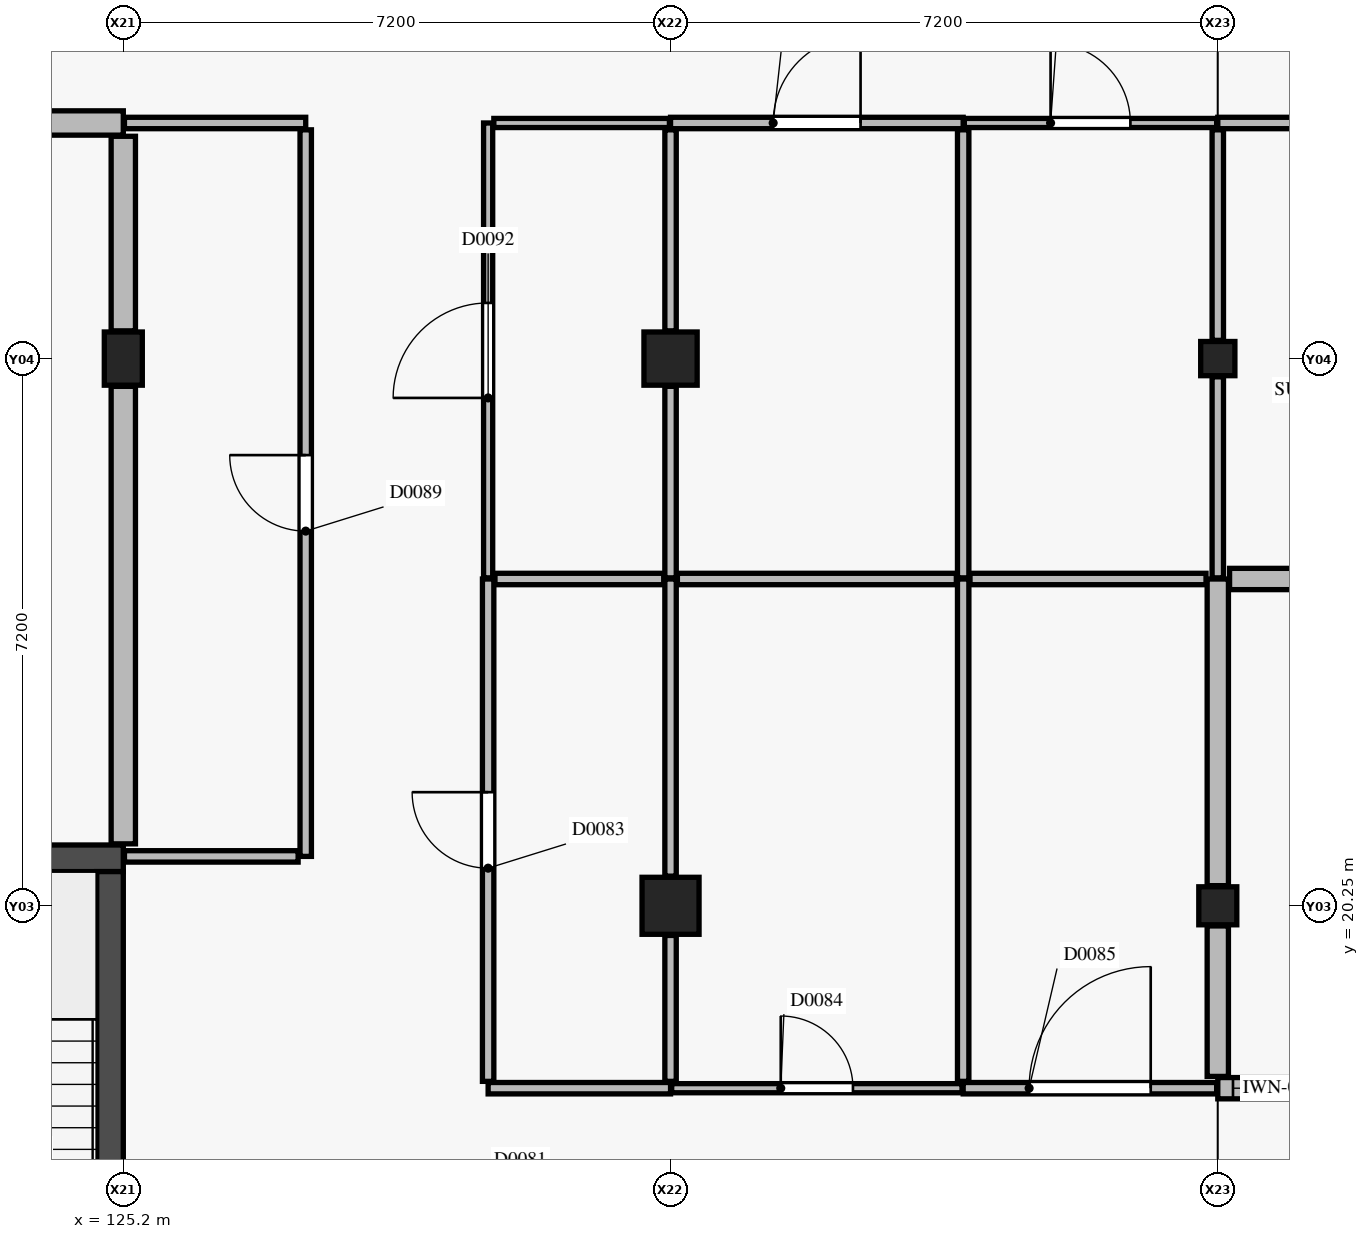
"""IFC4 building model, lengths in metres.
Left out: names, types, materials, properties, quantities, classifications, styles, units other than length and angle.
Written with IfcOpenShell. Run it as: python <this file> out.ifc"""

import sys

from ifc_helpers import new_model, si_unit, direction, frame, frame_2d, origin, origin_2d, place, context, subcontext, project, spatial, rectangle, extrude, element, fill, save


model = new_model("IFC4")
c1 = context("Model", 3, precision=1e-05, world=origin(), true_north=direction((0.0, 1.0)))
c2 = subcontext(c1, "Body", "Model", "MODEL_VIEW")
j1 = project(units=[si_unit("LENGTHUNIT", "METRE"), si_unit("PLANEANGLEUNIT", "RADIAN")], contexts=[c1])
p1 = place(None, origin())
s1 = spatial("IfcSite", under=j1, at=p1, CompositionType="ELEMENT")
p2 = place(p1, origin())
s2 = spatial("IfcBuilding", under=s1, at=p2, CompositionType="ELEMENT")
p3 = place(p2, origin())
s3 = spatial("IfcBuildingStorey", under=s2, at=p3, CompositionType="ELEMENT", Elevation=0.0)
p4 = place(p3, frame((125.2, 27.45, 0.0), z_axis=(0.0, 0.0, 1.0), x_axis=(1.0, 0.0, 0.0)))
e1 = element("IfcColumn", 1, at=p4, inside=s3, PredefinedType="COLUMN", context=c2, shape_type="SweptSolid", body=[
    extrude(rectangle(XDim=0.5, YDim=0.7, at=origin_2d()), origin(), (0.0, 0.0, 1.0), 4.8),
])
p5 = place(p3, frame((132.4, 20.25, 0.0), z_axis=(0.0, 0.0, 1.0), x_axis=(1.0, 0.0, 0.0)))
e2 = element("IfcColumn", 2, at=p5, inside=s3, PredefinedType="COLUMN", context=c2, shape_type="SweptSolid", body=[
    extrude(rectangle(XDim=0.75, YDim=0.75, at=origin_2d()), origin(), (0.0, 0.0, 1.0), 4.8),
])
p6 = place(p3, frame((132.4, 27.45, 0.0), z_axis=(0.0, 0.0, 1.0), x_axis=(1.0, 0.0, 0.0)))
e3 = element("IfcColumn", 3, at=p6, inside=s3, PredefinedType="COLUMN", context=c2, shape_type="SweptSolid", body=[
    extrude(rectangle(XDim=0.7, YDim=0.7, at=origin_2d()), origin(), (0.0, 0.0, 1.0), 4.8),
])
p7 = place(p3, frame((139.6, 20.25, 0.0), z_axis=(0.0, 0.0, 1.0), x_axis=(1.0, 0.0, 0.0)))
e4 = element("IfcColumn", 4, at=p7, inside=s3, PredefinedType="COLUMN", context=c2, shape_type="SweptSolid", body=[
    extrude(rectangle(XDim=0.5, YDim=0.5, at=origin_2d()), origin(), (0.0, 0.0, 1.0), 4.8),
])
p8 = place(p3, frame((139.6, 27.45, 0.0), z_axis=(0.0, 0.0, 1.0), x_axis=(1.0, 0.0, 0.0)))
e5 = element("IfcColumn", 5, at=p8, inside=s3, PredefinedType="COLUMN", context=c2, shape_type="SweptSolid", body=[
    extrude(rectangle(XDim=0.45, YDim=0.45, at=origin_2d()), origin(), (0.0, 0.0, 1.0), 4.8),
])
p9 = place(p3, frame((121.2, 20.875, 0.0), z_axis=(0.0, 0.0, 1.0), x_axis=(1.0, 0.0, 0.0)))
e6 = element("IfcWall", 6, at=p9, inside=s3, PredefinedType="SHEAR", context=c2, shape_type="SweptSolid", body=[
    extrude(rectangle(XDim=4.0, YDim=0.35, at=frame_2d((2.0, 0.0))), origin(), (0.0, 0.0, 1.0), 4.46),
])
p10 = place(p3, frame((125.025, 13.4, 0.0), z_axis=(0.0, 0.0, 1.0), x_axis=(0.0, 1.0, 0.0)))
e7 = element("IfcWall", 7, at=p10, inside=s3, PredefinedType="SHEAR", context=c2, shape_type="SweptSolid", body=[
    extrude(rectangle(XDim=7.3, YDim=0.35, at=frame_2d((3.65, 0.0))), origin(), (0.0, 0.0, 1.0), 4.46),
])
p11 = place(p10, frame((0.12, 0.0, 0.0)))
e8 = element("IfcOpeningElement", 8, at=p11, cuts=e7, PredefinedType="OPENING", context=c2, shape_type="SweptSolid", body=[
    extrude(rectangle(XDim=1.5, YDim=2.15, at=frame_2d((0.75, 1.075))), frame((0.0, 0.185, 0.0), z_axis=(0.0, -1.0, 0.0), x_axis=(1.0, 0.0, 0.0)), (0.0, 0.0, 1.0), 0.37),
])
p12 = place(p3, frame((121.775, 30.55, 0.0), z_axis=(0.0, 0.0, 1.0), x_axis=(1.0, 0.0, 0.0)))
e9 = element("IfcWall", 9, at=p12, inside=s3, PredefinedType="PARTITIONING", context=c2, shape_type="SweptSolid", body=[
    extrude(rectangle(XDim=3.425, YDim=0.32, at=frame_2d((1.712, 0.0))), origin(), (0.0, 0.0, 1.0), 3.925),
])
p13 = place(p3, frame((139.6, 17.85, 0.0), z_axis=(0.0, 0.0, 1.0), x_axis=(1.0, 0.0, 0.0)))
e10 = element("IfcWall", 10, at=p13, inside=s3, PredefinedType="PARTITIONING", context=c2, shape_type="SweptSolid", body=[
    extrude(rectangle(XDim=7.2, YDim=0.28, at=frame_2d((3.6, 0.0))), origin(), (0.0, 0.0, 1.0), 3.725),
])
p14 = place(p13, frame((2.925, 0.0, 0.0)))
e11 = element("IfcOpeningElement", 11, at=p14, cuts=e10, PredefinedType="OPENING", context=c2, shape_type="SweptSolid", body=[
    extrude(rectangle(XDim=1.35, YDim=2.2, at=frame_2d((0.675, 1.1))), frame((0.0, 0.15, 0.0), z_axis=(0.0, -1.0, 0.0), x_axis=(1.0, 0.0, 0.0)), (0.0, 0.0, 1.0), 0.3),
])
p15 = place(p13, frame((0.2, 0.0, 1.05)))
e12 = element("IfcOpeningElement", 12, at=p15, cuts=e10, PredefinedType="OPENING", context=c2, shape_type="SweptSolid", body=[
    extrude(rectangle(XDim=1.1, YDim=1.1, at=frame_2d((0.55, 0.55))), frame((0.0, 0.15, 0.0), z_axis=(0.0, -1.0, 0.0), x_axis=(1.0, 0.0, 0.0)), (0.0, 0.0, 1.0), 0.3),
])
p16 = place(p3, frame((130.0, 17.85, 0.0), z_axis=(0.0, 0.0, 1.0), x_axis=(1.0, 0.0, 0.0)))
e13 = element("IfcWall", 13, at=p16, inside=s3, PredefinedType="PARTITIONING", context=c2, shape_type="SweptSolid", body=[
    extrude(rectangle(XDim=2.4, YDim=0.15, at=frame_2d((1.2, 0.0))), origin(), (0.0, 0.0, 1.0), 3.925),
])
p17 = place(p3, frame((130.0, 17.94, 0.0), z_axis=(0.0, 0.0, 1.0), x_axis=(0.0, 1.0, 0.0)))
e14 = element("IfcWall", 14, at=p17, inside=s3, PredefinedType="PARTITIONING", context=c2, shape_type="SweptSolid", body=[
    extrude(rectangle(XDim=6.61, YDim=0.15, at=frame_2d((3.305, 0.0))), origin(), (0.0, 0.0, 1.0), 3.645),
])
p18 = place(p17, frame((2.805, 0.0, 0.0)))
e15 = element("IfcOpeningElement", 15, at=p18, cuts=e14, PredefinedType="OPENING", context=c2, shape_type="SweptSolid", body=[
    extrude(rectangle(XDim=1.0, YDim=2.15, at=frame_2d((0.5, 1.075))), frame((0.0, 0.085, 0.0), z_axis=(0.0, -1.0, 0.0), x_axis=(1.0, 0.0, 0.0)), (0.0, 0.0, 1.0), 0.17),
])
p19 = place(p3, frame((136.25, 17.85, 0.0), z_axis=(0.0, 0.0, 1.0), x_axis=(1.0, 0.0, 0.0)))
e16 = element("IfcWall", 16, at=p19, inside=s3, PredefinedType="PARTITIONING", context=c2, shape_type="SweptSolid", body=[
    extrude(rectangle(XDim=3.335, YDim=0.15, at=frame_2d((1.667, 0.0))), origin(), (0.0, 0.0, 1.0), 3.725),
])
p20 = place(p19, frame((0.867, 0.0, 0.0)))
e17 = element("IfcOpeningElement", 17, at=p20, cuts=e16, PredefinedType="OPENING", context=c2, shape_type="SweptSolid", body=[
    extrude(rectangle(XDim=1.6, YDim=2.25, at=frame_2d((0.8, 1.125))), frame((0.0, 0.085, 0.0), z_axis=(0.0, -1.0, 0.0), x_axis=(1.0, 0.0, 0.0)), (0.0, 0.0, 1.0), 0.17),
])
p21 = place(p3, frame((125.215, 20.9, 0.0), z_axis=(0.0, 0.0, 1.0), x_axis=(1.0, 0.0, 0.0)))
e18 = element("IfcWall", 18, at=p21, inside=s3, PredefinedType="PARTITIONING", context=c2, shape_type="SweptSolid", body=[
    extrude(rectangle(XDim=2.285, YDim=0.15, at=frame_2d((1.143, 0.0))), origin(), (0.0, 0.0, 1.0), 4.46),
])
p22 = place(p3, frame((125.215, 30.55, 0.0), z_axis=(0.0, 0.0, 1.0), x_axis=(1.0, 0.0, 0.0)))
e19 = element("IfcWall", 19, at=p22, inside=s3, PredefinedType="PARTITIONING", context=c2, shape_type="SweptSolid", body=[
    extrude(rectangle(XDim=2.385, YDim=0.15, at=frame_2d((1.192, 0.0))), origin(), (0.0, 0.0, 1.0), 3.925),
])
p23 = place(p3, frame((127.6, 20.9, 0.0), z_axis=(0.0, 0.0, 1.0), x_axis=(0.0, 1.0, 0.0)))
e20 = element("IfcWall", 20, at=p23, inside=s3, PredefinedType="PARTITIONING", context=c2, shape_type="SweptSolid", body=[
    extrude(rectangle(XDim=9.56, YDim=0.15, at=frame_2d((4.78, 0.0))), origin(), (0.0, 0.0, 1.0), 3.795),
])
p24 = place(p23, frame((4.28, 0.0, 0.0)))
e21 = element("IfcOpeningElement", 21, at=p24, cuts=e20, PredefinedType="OPENING", context=c2, shape_type="SweptSolid", body=[
    extrude(rectangle(XDim=1.0, YDim=2.15, at=frame_2d((0.5, 1.075))), frame((0.0, 0.085, 0.0), z_axis=(0.0, -1.0, 0.0), x_axis=(1.0, 0.0, 0.0)), (0.0, 0.0, 1.0), 0.17),
])
p25 = place(p3, frame((132.4, 30.55, 0.0), z_axis=(0.0, 0.0, 1.0), x_axis=(1.0, 0.0, 0.0)))
e22 = element("IfcWall", 22, at=p25, inside=s3, PredefinedType="PARTITIONING", context=c2, shape_type="SweptSolid", body=[
    extrude(rectangle(XDim=3.85, YDim=0.15, at=frame_2d((1.925, 0.0))), origin(), (0.0, 0.0, 1.0), 3.725),
])
p26 = place(p25, frame((1.35, 0.0, 0.0)))
e23 = element("IfcOpeningElement", 23, at=p26, cuts=e22, PredefinedType="OPENING", context=c2, shape_type="SweptSolid", body=[
    extrude(rectangle(XDim=1.15, YDim=2.15, at=frame_2d((0.575, 1.075))), frame((0.0, 0.085, 0.0), z_axis=(0.0, -1.0, 0.0), x_axis=(1.0, 0.0, 0.0)), (0.0, 0.0, 1.0), 0.17),
])
p27 = place(p3, frame((139.6, 30.55, 0.0), z_axis=(0.0, 0.0, 1.0), x_axis=(1.0, 0.0, 0.0)))
e24 = element("IfcWall", 24, at=p27, inside=s3, PredefinedType="PARTITIONING", context=c2, shape_type="SweptSolid", body=[
    extrude(rectangle(XDim=7.2, YDim=0.15, at=frame_2d((3.6, 0.0))), origin(), (0.0, 0.0, 1.0), 3.795),
])
p28 = place(p27, frame((3.1, 0.0, 0.0)))
e25 = element("IfcOpeningElement", 25, at=p28, cuts=e24, PredefinedType="OPENING", context=c2, shape_type="SweptSolid", body=[
    extrude(rectangle(XDim=1.0, YDim=2.15, at=frame_2d((0.5, 1.075))), frame((0.0, 0.085, 0.0), z_axis=(0.0, -1.0, 0.0), x_axis=(1.0, 0.0, 0.0)), (0.0, 0.0, 1.0), 0.17),
])
p29 = place(p3, frame((132.415, 17.85, 0.0), z_axis=(0.0, 0.0, 1.0), x_axis=(1.0, 0.0, 0.0)))
e26 = element("IfcWall", 26, at=p29, inside=s3, PredefinedType="PARTITIONING", context=c2, shape_type="SweptSolid", body=[
    extrude(rectangle(XDim=3.82, YDim=0.12, at=frame_2d((1.91, 0.0))), origin(), (0.0, 0.0, 1.0), 3.925),
])
p30 = place(p29, frame((1.435, 0.0, 0.0)))
e27 = element("IfcOpeningElement", 27, at=p30, cuts=e26, PredefinedType="OPENING", context=c2, shape_type="SweptSolid", body=[
    extrude(rectangle(XDim=0.95, YDim=2.1, at=frame_2d((0.475, 1.05))), frame((0.0, 0.07, 0.0), z_axis=(0.0, -1.0, 0.0), x_axis=(1.0, 0.0, 0.0)), (0.0, 0.0, 1.0), 0.14),
])
p31 = place(p3, frame((130.0, 24.565, 0.0), z_axis=(0.0, 0.0, 1.0), x_axis=(0.0, 1.0, 0.0)))
e28 = element("IfcWall", 28, at=p31, inside=s3, PredefinedType="PARTITIONING", context=c2, shape_type="SweptSolid", body=[
    extrude(rectangle(XDim=5.985, YDim=0.12, at=frame_2d((2.993, 0.0))), origin(), (0.0, 0.0, 1.0), 3.795),
])
p32 = place(p31, frame((2.367, 0.0, 0.0)))
e29 = element("IfcOpeningElement", 29, at=p32, cuts=e28, PredefinedType="OPENING", context=c2, shape_type="SweptSolid", body=[
    extrude(rectangle(XDim=1.25, YDim=2.15, at=frame_2d((0.625, 1.075))), frame((0.0, 0.07, 0.0), z_axis=(0.0, -1.0, 0.0), x_axis=(1.0, 0.0, 0.0)), (0.0, 0.0, 1.0), 0.14),
])
p33 = place(p3, frame((130.075, 30.55, 0.0), z_axis=(0.0, 0.0, 1.0), x_axis=(1.0, 0.0, 0.0)))
e30 = element("IfcWall", 30, at=p33, inside=s3, PredefinedType="PARTITIONING", context=c2, shape_type="SweptSolid", body=[
    extrude(rectangle(XDim=2.31, YDim=0.12, at=frame_2d((1.155, 0.0))), origin(), (0.0, 0.0, 1.0), 3.725),
])
p34 = place(p3, frame((136.265, 30.55, 0.0), z_axis=(0.0, 0.0, 1.0), x_axis=(1.0, 0.0, 0.0)))
e31 = element("IfcWall", 31, at=p34, inside=s3, PredefinedType="PARTITIONING", context=c2, shape_type="SweptSolid", body=[
    extrude(rectangle(XDim=3.32, YDim=0.12, at=frame_2d((1.66, 0.0))), origin(), (0.0, 0.0, 1.0), 3.795),
])
p35 = place(p34, frame((1.135, 0.0, 0.0)))
e32 = element("IfcOpeningElement", 32, at=p35, cuts=e31, PredefinedType="OPENING", context=c2, shape_type="SweptSolid", body=[
    extrude(rectangle(XDim=1.05, YDim=2.15, at=frame_2d((0.525, 1.075))), frame((0.0, 0.07, 0.0), z_axis=(0.0, -1.0, 0.0), x_axis=(1.0, 0.0, 0.0)), (0.0, 0.0, 1.0), 0.14),
])
p36 = place(p3, frame((125.2, 21.065, 0.0), z_axis=(0.0, 0.0, 1.0), x_axis=(0.0, 1.0, 0.0)))
e33 = element("IfcWall", 33, at=p36, inside=s3, PredefinedType="PARTITIONING", context=c2, shape_type="SweptSolid", body=[
    extrude(rectangle(XDim=6.02, YDim=0.32, at=frame_2d((3.01, 0.0))), origin(), (0.0, 0.0, 1.0), 4.46),
])
p37 = place(p3, frame((125.2, 27.815, 0.0), z_axis=(0.0, 0.0, 1.0), x_axis=(0.0, 1.0, 0.0)))
e34 = element("IfcWall", 34, at=p37, inside=s3, PredefinedType="PARTITIONING", context=c2, shape_type="SweptSolid", body=[
    extrude(rectangle(XDim=2.56, YDim=0.32, at=frame_2d((1.28, 0.0))), origin(), (0.0, 0.0, 1.0), 3.925),
])
p38 = place(p3, frame((139.6, 18.005, 0.0), z_axis=(0.0, 0.0, 1.0), x_axis=(0.0, 1.0, 0.0)))
e35 = element("IfcWall", 35, at=p38, inside=s3, PredefinedType="PARTITIONING", context=c2, shape_type="SweptSolid", body=[
    extrude(rectangle(XDim=1.98, YDim=0.28, at=frame_2d((0.99, 0.0))), origin(), (0.0, 0.0, 1.0), 3.725),
])
p39 = place(p3, frame((139.6, 20.515, 0.0), z_axis=(0.0, 0.0, 1.0), x_axis=(0.0, 1.0, 0.0)))
e36 = element("IfcWall", 36, at=p39, inside=s3, PredefinedType="PARTITIONING", context=c2, shape_type="SweptSolid", body=[
    extrude(rectangle(XDim=4.035, YDim=0.28, at=frame_2d((2.018, 0.0))), origin(), (0.0, 0.0, 1.0), 3.795),
])
p40 = place(p3, frame((139.755, 24.55, 0.0), z_axis=(0.0, 0.0, 1.0), x_axis=(1.0, 0.0, 0.0)))
e37 = element("IfcWall", 37, at=p40, inside=s3, PredefinedType="PARTITIONING", context=c2, shape_type="SweptSolid", body=[
    extrude(rectangle(XDim=6.89, YDim=0.28, at=frame_2d((3.445, 0.0))), origin(), (0.0, 0.0, 1.0), 4.46),
])
p41 = place(p3, frame((132.4, 17.94, 0.0), z_axis=(0.0, 0.0, 1.0), x_axis=(0.0, 1.0, 0.0)))
e38 = element("IfcWall", 38, at=p41, inside=s3, PredefinedType="PARTITIONING", context=c2, shape_type="SweptSolid", body=[
    extrude(rectangle(XDim=1.92, YDim=0.15, at=frame_2d((0.96, 0.0))), origin(), (0.0, 0.0, 1.0), 3.925),
])
p42 = place(p3, frame((132.4, 20.64, 0.0), z_axis=(0.0, 0.0, 1.0), x_axis=(0.0, 1.0, 0.0)))
e39 = element("IfcWall", 39, at=p42, inside=s3, PredefinedType="PARTITIONING", context=c2, shape_type="SweptSolid", body=[
    extrude(rectangle(XDim=3.91, YDim=0.15, at=frame_2d((1.955, 0.0))), origin(), (0.0, 0.0, 1.0), 3.965),
])
p43 = place(p3, frame((130.09, 24.55, 0.0), z_axis=(0.0, 0.0, 1.0), x_axis=(1.0, 0.0, 0.0)))
e40 = element("IfcWall", 40, at=p43, inside=s3, PredefinedType="PARTITIONING", context=c2, shape_type="SweptSolid", body=[
    extrude(rectangle(XDim=2.22, YDim=0.15, at=frame_2d((1.11, 0.0))), origin(), (0.0, 0.0, 1.0), 4.46),
])
p44 = place(p3, frame((136.25, 17.94, 0.0), z_axis=(0.0, 0.0, 1.0), x_axis=(0.0, 1.0, 0.0)))
e41 = element("IfcWall", 41, at=p44, inside=s3, PredefinedType="PARTITIONING", context=c2, shape_type="SweptSolid", body=[
    extrude(rectangle(XDim=6.61, YDim=0.15, at=frame_2d((3.305, 0.0))), origin(), (0.0, 0.0, 1.0), 3.745),
])
p45 = place(p3, frame((132.49, 24.55, 0.0), z_axis=(0.0, 0.0, 1.0), x_axis=(1.0, 0.0, 0.0)))
e42 = element("IfcWall", 42, at=p45, inside=s3, PredefinedType="PARTITIONING", context=c2, shape_type="SweptSolid", body=[
    extrude(rectangle(XDim=3.67, YDim=0.15, at=frame_2d((1.835, 0.0))), origin(), (0.0, 0.0, 1.0), 4.46),
])
p46 = place(p3, frame((136.34, 24.55, 0.0), z_axis=(0.0, 0.0, 1.0), x_axis=(1.0, 0.0, 0.0)))
e43 = element("IfcWall", 43, at=p46, inside=s3, PredefinedType="PARTITIONING", context=c2, shape_type="SweptSolid", body=[
    extrude(rectangle(XDim=3.105, YDim=0.15, at=frame_2d((1.552, 0.0))), origin(), (0.0, 0.0, 1.0), 4.46),
])
p47 = place(p3, frame((132.4, 24.565, 0.0), z_axis=(0.0, 0.0, 1.0), x_axis=(0.0, 1.0, 0.0)))
e44 = element("IfcWall", 44, at=p47, inside=s3, PredefinedType="PARTITIONING", context=c2, shape_type="SweptSolid", body=[
    extrude(rectangle(XDim=2.52, YDim=0.15, at=frame_2d((1.26, 0.0))), origin(), (0.0, 0.0, 1.0), 3.965),
])
p48 = place(p3, frame((132.4, 27.815, 0.0), z_axis=(0.0, 0.0, 1.0), x_axis=(0.0, 1.0, 0.0)))
e45 = element("IfcWall", 45, at=p48, inside=s3, PredefinedType="PARTITIONING", context=c2, shape_type="SweptSolid", body=[
    extrude(rectangle(XDim=2.645, YDim=0.15, at=frame_2d((1.323, 0.0))), origin(), (0.0, 0.0, 1.0), 3.725),
])
p49 = place(p3, frame((136.25, 24.565, 0.0), z_axis=(0.0, 0.0, 1.0), x_axis=(0.0, 1.0, 0.0)))
e46 = element("IfcWall", 46, at=p49, inside=s3, PredefinedType="PARTITIONING", context=c2, shape_type="SweptSolid", body=[
    extrude(rectangle(XDim=5.895, YDim=0.15, at=frame_2d((2.948, 0.0))), origin(), (0.0, 0.0, 1.0), 3.925),
])
p50 = place(p3, frame((139.6, 24.565, 0.0), z_axis=(0.0, 0.0, 1.0), x_axis=(0.0, 1.0, 0.0)))
e47 = element("IfcWall", 47, at=p50, inside=s3, PredefinedType="PARTITIONING", context=c2, shape_type="SweptSolid", body=[
    extrude(rectangle(XDim=2.645, YDim=0.15, at=frame_2d((1.323, 0.0))), origin(), (0.0, 0.0, 1.0), 3.795),
])
p51 = place(p3, frame((139.6, 27.69, 0.0), z_axis=(0.0, 0.0, 1.0), x_axis=(0.0, 1.0, 0.0)))
e48 = element("IfcWall", 48, at=p51, inside=s3, PredefinedType="PARTITIONING", context=c2, shape_type="SweptSolid", body=[
    extrude(rectangle(XDim=2.77, YDim=0.15, at=frame_2d((1.385, 0.0))), origin(), (0.0, 0.0, 1.0), 3.795),
])
p52 = place(p18, origin())
e49 = element("IfcDoor", 49, at=p52, inside=s3, OperationType="SINGLE_SWING_RIGHT", PredefinedType="DOOR", context=c2, shape_type="SweptSolid", body=[
    extrude(rectangle(XDim=1.0, YDim=2.15, at=frame_2d((0.5, 1.075))), frame((0.0, 0.025, 0.0), z_axis=(0.0, -1.0, 0.0), x_axis=(1.0, 0.0, 0.0)), (0.0, 0.0, 1.0), 0.05),
])
fill(e15, e49)
p53 = place(p30, origin())
e50 = element("IfcDoor", 50, at=p53, inside=s3, OperationType="SINGLE_SWING_LEFT", PredefinedType="DOOR", context=c2, shape_type="SweptSolid", body=[
    extrude(rectangle(XDim=0.95, YDim=2.1, at=frame_2d((0.475, 1.05))), frame((0.0, 0.025, 0.0), z_axis=(0.0, -1.0, 0.0), x_axis=(1.0, 0.0, 0.0)), (0.0, 0.0, 1.0), 0.05),
])
fill(e27, e50)
p54 = place(p20, origin())
e51 = element("IfcDoor", 51, at=p54, inside=s3, OperationType="SINGLE_SWING_RIGHT", PredefinedType="DOOR", context=c2, shape_type="SweptSolid", body=[
    extrude(rectangle(XDim=1.6, YDim=2.25, at=frame_2d((0.8, 1.125))), frame((0.0, 0.025, 0.0), z_axis=(0.0, -1.0, 0.0), x_axis=(1.0, 0.0, 0.0)), (0.0, 0.0, 1.0), 0.05),
])
fill(e17, e51)
p55 = place(p15, origin())
e52 = element("IfcWindow", 52, at=p55, inside=s3, PartitioningType="SINGLE_PANEL", PredefinedType="WINDOW", context=c2, shape_type="SweptSolid", body=[
    extrude(rectangle(XDim=1.1, YDim=1.1, at=frame_2d((0.55, 0.55))), frame((0.0, 0.03, 0.0), z_axis=(0.0, -1.0, 0.0), x_axis=(1.0, 0.0, 0.0)), (0.0, 0.0, 1.0), 0.06),
])
fill(e12, e52)
p56 = place(p24, origin())
e53 = element("IfcDoor", 53, at=p56, inside=s3, OperationType="SINGLE_SWING_RIGHT", PredefinedType="DOOR", context=c2, shape_type="SweptSolid", body=[
    extrude(rectangle(XDim=1.0, YDim=2.15, at=frame_2d((0.5, 1.075))), frame((0.0, 0.025, 0.0), z_axis=(0.0, -1.0, 0.0), x_axis=(1.0, 0.0, 0.0)), (0.0, 0.0, 1.0), 0.05),
])
fill(e21, e53)
p57 = place(p32, origin())
e54 = element("IfcDoor", 54, at=p57, inside=s3, OperationType="SINGLE_SWING_LEFT", PredefinedType="DOOR", context=c2, shape_type="SweptSolid", body=[
    extrude(rectangle(XDim=1.25, YDim=2.15, at=frame_2d((0.625, 1.075))), frame((0.0, 0.025, 0.0), z_axis=(0.0, -1.0, 0.0), x_axis=(1.0, 0.0, 0.0)), (0.0, 0.0, 1.0), 0.05),
])
fill(e29, e54)
p58 = place(p26, origin())
e55 = element("IfcDoor", 55, at=p58, inside=s3, OperationType="SINGLE_SWING_RIGHT", PredefinedType="DOOR", context=c2, shape_type="SweptSolid", body=[
    extrude(rectangle(XDim=1.15, YDim=2.15, at=frame_2d((0.575, 1.075))), frame((0.0, 0.025, 0.0), z_axis=(0.0, -1.0, 0.0), x_axis=(1.0, 0.0, 0.0)), (0.0, 0.0, 1.0), 0.05),
])
fill(e23, e55)
p59 = place(p35, origin())
e56 = element("IfcDoor", 56, at=p59, inside=s3, OperationType="SINGLE_SWING_LEFT", PredefinedType="DOOR", context=c2, shape_type="SweptSolid", body=[
    extrude(rectangle(XDim=1.05, YDim=2.15, at=frame_2d((0.525, 1.075))), frame((0.0, 0.025, 0.0), z_axis=(0.0, -1.0, 0.0), x_axis=(1.0, 0.0, 0.0)), (0.0, 0.0, 1.0), 0.05),
])
fill(e32, e56)
save(model, sys.argv[1])
